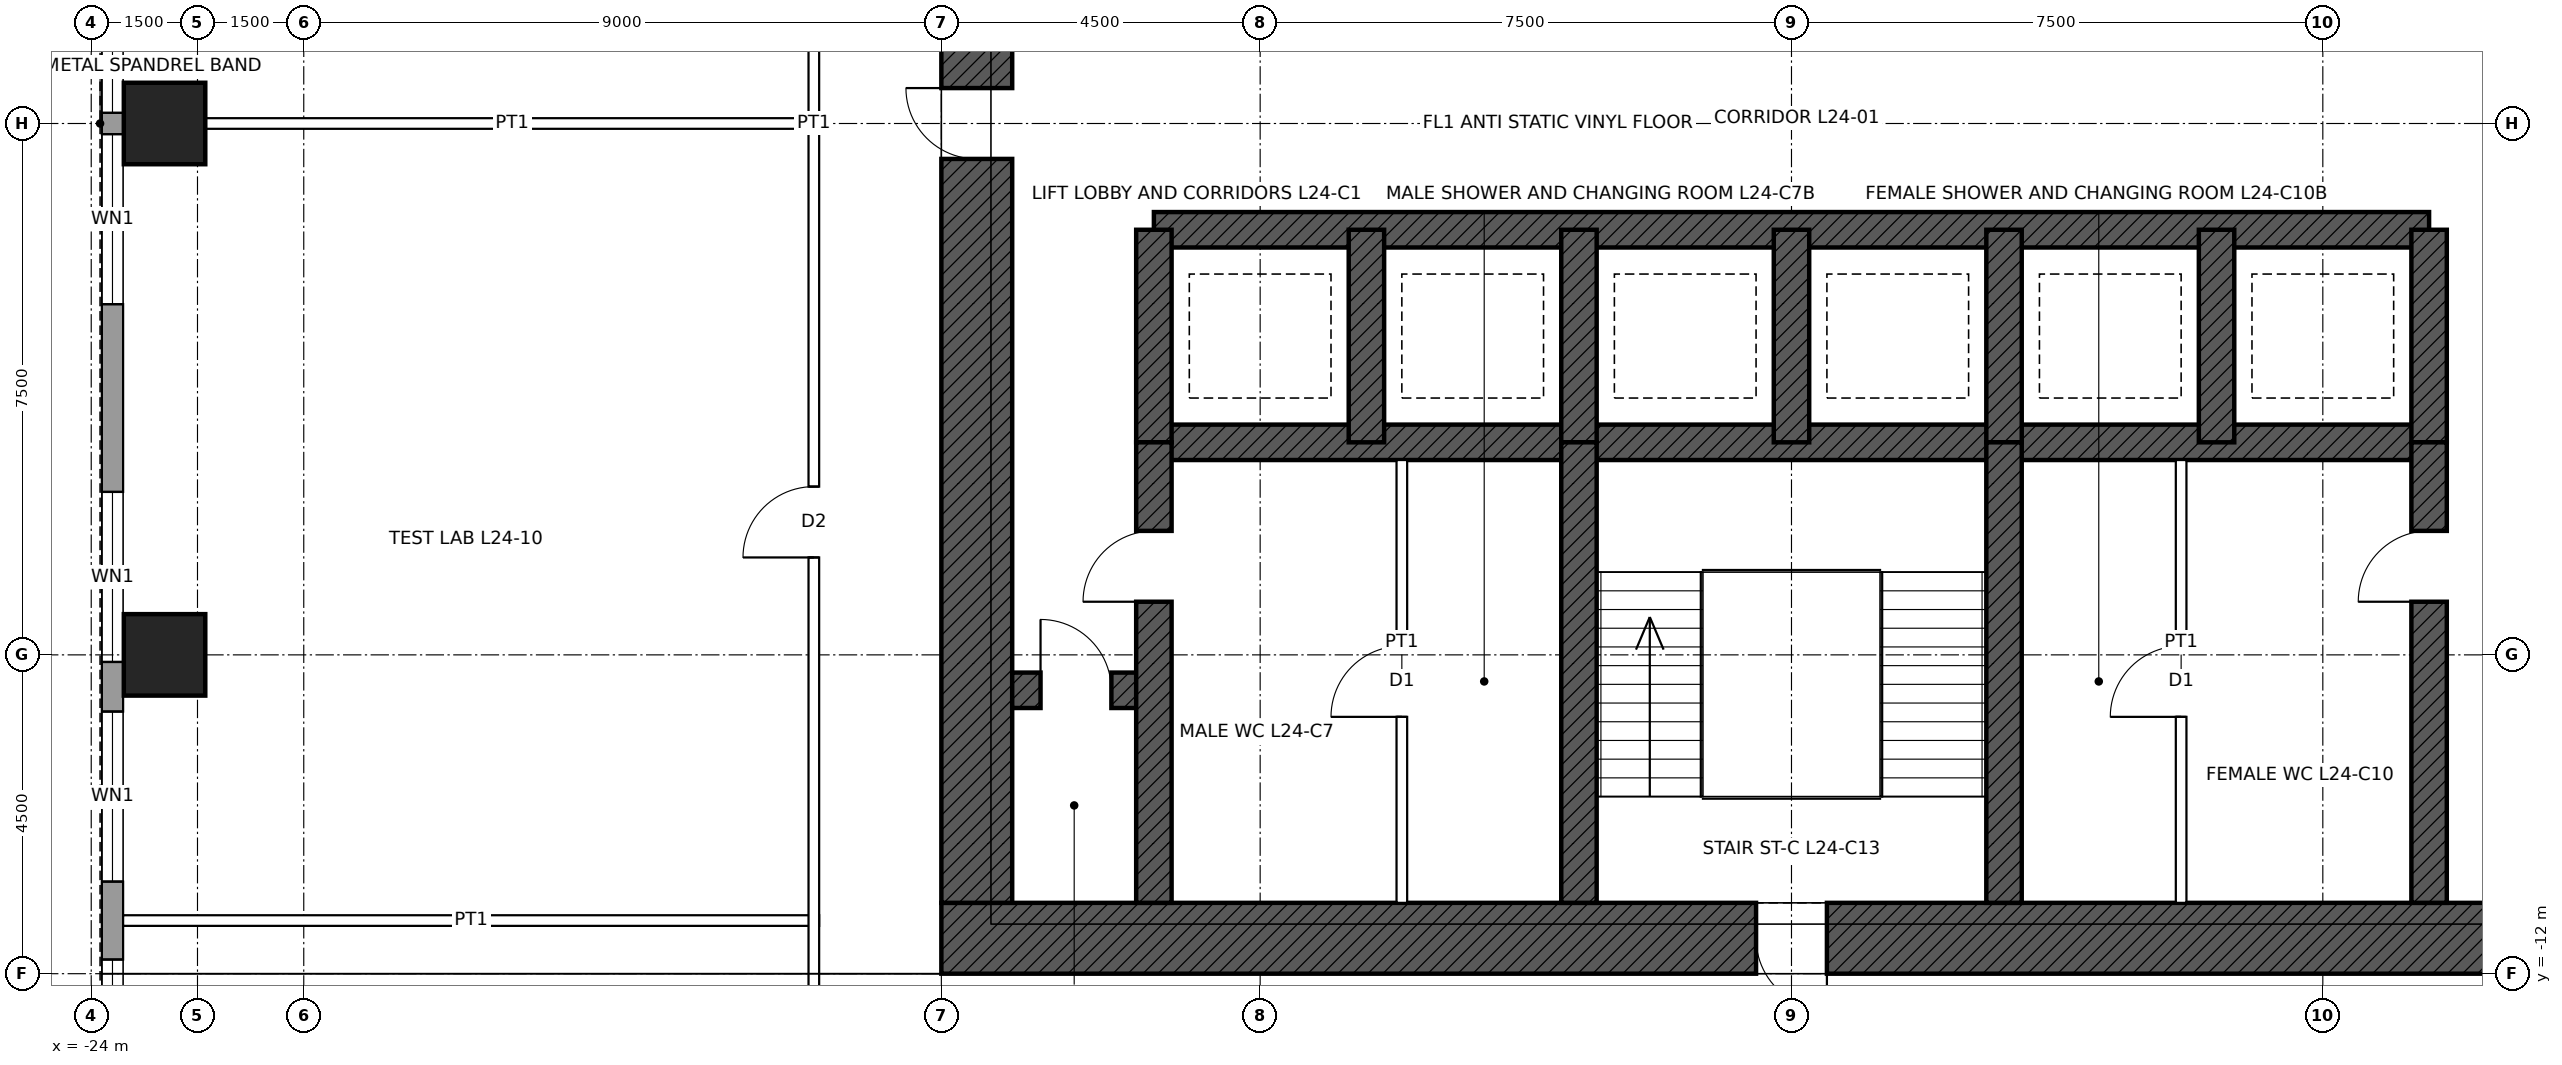
"""IFC4 building model, lengths in metres.
Left out: names, types, materials, properties, quantities, classifications, styles, units other than length and angle.
Written with IfcOpenShell. Run it as: python <this file> out.ifc"""

import sys

from ifc_helpers import new_model, si_unit, direction, frame, frame_2d, origin, origin_2d, place, context, subcontext, project, spatial, rectangle, hollow_rectangle, extrude, element, fill, save


model = new_model("IFC4")
c1 = context("Model", 3, precision=1e-05, world=origin(), true_north=direction((0.0, 1.0)))
c2 = subcontext(c1, "Body", "Model", "MODEL_VIEW")
j1 = project(units=[si_unit("LENGTHUNIT", "METRE"), si_unit("PLANEANGLEUNIT", "RADIAN")], contexts=[c1])
p1 = place(None, origin())
s1 = spatial("IfcSite", under=j1, at=p1, CompositionType="ELEMENT")
p2 = place(p1, origin())
s2 = spatial("IfcBuilding", under=s1, at=p2, CompositionType="ELEMENT")
p3 = place(p2, frame((0.0, 0.0, 122.4)))
s3 = spatial("IfcBuildingStorey", under=s2, at=p3, CompositionType="ELEMENT", Elevation=122.4)
for number, where, z_axis, x_axis in (
    (1, (-22.965, -7.5, 0.0), (0.0, 0.0, 1.0), (1.0, 0.0, 0.0)),
    (2, (-22.965, 0.0, 0.0), (0.0, 0.0, 1.0), (1.0, 0.0, 0.0)),
):
    element("IfcColumn", number, at=place(p3, frame(where, z_axis=z_axis, x_axis=x_axis)), inside=s3, PredefinedType="COLUMN", context=c2, shape_type="SweptSolid", body=[
        extrude(hollow_rectangle(XDim=1.15, YDim=1.15, WallThickness=0.075, at=origin_2d()), origin(), (0.0, 0.0, 1.0), 4.5),
    ])
p4 = place(p3, frame((12.0, -11.5, 0.0), z_axis=(0.0, 0.0, 1.0), x_axis=(-1.0, 0.0, 0.0)))
e3 = element("IfcWall", 3, at=p4, inside=s3, PredefinedType="SHEAR", context=c2, shape_type="SweptSolid", body=[
    extrude(rectangle(XDim=24.0, YDim=1.0, at=frame_2d((12.0, 0.0))), origin(), (0.0, 0.0, 1.0), 4.5),
])
p5 = place(p4, frame((11.5, 0.0, 0.0)))
e4 = element("IfcOpeningElement", 4, at=p5, cuts=e3, PredefinedType="OPENING", context=c2, shape_type="SweptSolid", body=[
    extrude(rectangle(XDim=1.0, YDim=2.1, at=frame_2d((0.5, 1.05))), frame((0.0, 0.51, 0.0), z_axis=(0.0, -1.0, 0.0), x_axis=(1.0, 0.0, 0.0)), (0.0, 0.0, 1.0), 1.02),
])
p6 = place(p4, frame((1.0, 0.0, 0.0)))
e5 = element("IfcOpeningElement", 5, at=p6, cuts=e3, PredefinedType="OPENING", context=c2, shape_type="SweptSolid", body=[
    extrude(rectangle(XDim=1.0, YDim=2.4, at=frame_2d((0.5, 1.2))), frame((0.0, 0.51, 0.0), z_axis=(0.0, -1.0, 0.0), x_axis=(1.0, 0.0, 0.0)), (0.0, 0.0, 1.0), 1.02),
])
p7 = place(p3, frame((-11.5, -11.0, 0.0), z_axis=(0.0, 0.0, 1.0), x_axis=(0.0, 1.0, 0.0)))
e6 = element("IfcWall", 6, at=p7, inside=s3, PredefinedType="SHEAR", context=c2, shape_type="SweptSolid", body=[
    extrude(rectangle(XDim=22.0, YDim=1.0, at=frame_2d((11.0, 0.0))), origin(), (0.0, 0.0, 1.0), 4.5),
])
p8 = place(p7, frame((10.5, 0.0, 0.0)))
e7 = element("IfcOpeningElement", 7, at=p8, cuts=e6, PredefinedType="OPENING", context=c2, shape_type="SweptSolid", body=[
    extrude(rectangle(XDim=1.0, YDim=2.4, at=frame_2d((0.5, 1.2))), frame((0.0, 0.51, 0.0), z_axis=(0.0, -1.0, 0.0), x_axis=(1.0, 0.0, 0.0)), (0.0, 0.0, 1.0), 1.02),
])
for number, where, z_axis, x_axis in (
    (8, (-9.0, -1.5, 0.0), (0.0, 0.0, 1.0), (1.0, 0.0, 0.0)),
    (9, (-9.0, -4.5, 0.0), (0.0, 0.0, 1.0), (1.0, 0.0, 0.0)),
):
    element("IfcWall", number, at=place(p3, frame(where, z_axis=z_axis, x_axis=x_axis)), inside=s3, PredefinedType="SHEAR", context=c2, shape_type="SweptSolid", body=[
        extrude(rectangle(XDim=18.0, YDim=0.5, at=frame_2d((9.0, 0.0))), origin(), (0.0, 0.0, 1.0), 4.5),
    ])
p9 = place(p3, frame((-11.0, -8.0, 0.0), z_axis=(0.0, 0.0, 1.0), x_axis=(1.0, 0.0, 0.0)))
e10 = element("IfcWall", 10, at=p9, inside=s3, PredefinedType="SHEAR", context=c2, shape_type="SweptSolid", body=[
    extrude(rectangle(XDim=2.0, YDim=0.5, at=frame_2d((1.0, 0.0))), origin(), (0.0, 0.0, 1.0), 4.5),
])
p10 = place(p9, frame((0.4, 0.0, 0.0)))
e11 = element("IfcOpeningElement", 11, at=p10, cuts=e10, PredefinedType="OPENING", context=c2, shape_type="SweptSolid", body=[
    extrude(rectangle(XDim=1.0, YDim=2.1, at=frame_2d((0.5, 1.05))), frame((0.0, 0.26, 0.0), z_axis=(0.0, -1.0, 0.0), x_axis=(1.0, 0.0, 0.0)), (0.0, 0.0, 1.0), 0.52),
])
for number, where, z_axis, x_axis in (
    (12, (-9.0, -4.5, 0.0), (0.0, 0.0, 1.0), (0.0, 1.0, 0.0)),
    (13, (9.0, -4.5, 0.0), (0.0, 0.0, 1.0), (0.0, 1.0, 0.0)),
    (14, (-6.0, -4.5, 0.0), (0.0, 0.0, 1.0), (0.0, 1.0, 0.0)),
    (15, (-3.0, -4.5, 0.0), (0.0, 0.0, 1.0), (0.0, 1.0, 0.0)),
    (16, (0.0, -4.5, 0.0), (0.0, 0.0, 1.0), (0.0, 1.0, 0.0)),
    (17, (3.0, -4.5, 0.0), (0.0, 0.0, 1.0), (0.0, 1.0, 0.0)),
    (18, (6.0, -4.5, 0.0), (0.0, 0.0, 1.0), (0.0, 1.0, 0.0)),
):
    element("IfcWall", number, at=place(p3, frame(where, z_axis=z_axis, x_axis=x_axis)), inside=s3, PredefinedType="SHEAR", context=c2, shape_type="SweptSolid", body=[
        extrude(rectangle(XDim=3.0, YDim=0.5, at=frame_2d((1.5, 0.0))), origin(), (0.0, 0.0, 1.0), 4.5),
    ])
p11 = place(p3, frame((-9.0, -11.0, 0.0), z_axis=(0.0, 0.0, 1.0), x_axis=(0.0, 1.0, 0.0)))
e19 = element("IfcWall", 19, at=p11, inside=s3, PredefinedType="SHEAR", context=c2, shape_type="SweptSolid", body=[
    extrude(rectangle(XDim=6.5, YDim=0.5, at=frame_2d((3.25, 0.0))), origin(), (0.0, 0.0, 1.0), 4.5),
])
p12 = place(p11, frame((4.25, 0.0, 0.0)))
e20 = element("IfcOpeningElement", 20, at=p12, cuts=e19, PredefinedType="OPENING", context=c2, shape_type="SweptSolid", body=[
    extrude(rectangle(XDim=1.0, YDim=2.1, at=frame_2d((0.5, 1.05))), frame((0.0, 0.26, 0.0), z_axis=(0.0, -1.0, 0.0), x_axis=(1.0, 0.0, 0.0)), (0.0, 0.0, 1.0), 0.52),
])
p13 = place(p3, frame((9.0, -11.0, 0.0), z_axis=(0.0, 0.0, 1.0), x_axis=(0.0, 1.0, 0.0)))
e21 = element("IfcWall", 21, at=p13, inside=s3, PredefinedType="SHEAR", context=c2, shape_type="SweptSolid", body=[
    extrude(rectangle(XDim=6.5, YDim=0.5, at=frame_2d((3.25, 0.0))), origin(), (0.0, 0.0, 1.0), 4.5),
])
p14 = place(p13, frame((4.25, 0.0, 0.0)))
e22 = element("IfcOpeningElement", 22, at=p14, cuts=e21, PredefinedType="OPENING", context=c2, shape_type="SweptSolid", body=[
    extrude(rectangle(XDim=1.0, YDim=2.1, at=frame_2d((0.5, 1.05))), frame((0.0, 0.26, 0.0), z_axis=(0.0, -1.0, 0.0), x_axis=(1.0, 0.0, 0.0)), (0.0, 0.0, 1.0), 0.52),
])
for number, where, z_axis, x_axis in (
    (23, (-3.0, -11.0, 0.0), (0.0, 0.0, 1.0), (0.0, 1.0, 0.0)),
    (24, (3.0, -11.0, 0.0), (0.0, 0.0, 1.0), (0.0, 1.0, 0.0)),
):
    element("IfcWall", number, at=place(p3, frame(where, z_axis=z_axis, x_axis=x_axis)), inside=s3, PredefinedType="SHEAR", context=c2, shape_type="SweptSolid", body=[
        extrude(rectangle(XDim=6.5, YDim=0.5, at=frame_2d((3.25, 0.0))), origin(), (0.0, 0.0, 1.0), 4.5),
    ])
p15 = place(p3, frame((-23.7, -16.2, 0.0), z_axis=(0.0, 0.0, 1.0), x_axis=(0.0, 1.0, 0.0)))
e25 = element("IfcWall", 25, at=p15, inside=s3, PredefinedType="SOLIDWALL", context=c2, shape_type="SweptSolid", body=[
    extrude(rectangle(XDim=32.4, YDim=0.3, at=frame_2d((16.2, 0.0))), origin(), (0.0, 0.0, 1.0), 4.3),
])
p16 = place(p15, frame((2.0, 0.0, 1.0)))
e26 = element("IfcOpeningElement", 26, at=p16, cuts=e25, PredefinedType="OPENING", context=c2, shape_type="SweptSolid", body=[
    extrude(rectangle(XDim=2.4, YDim=1.2, at=frame_2d((1.2, 0.6))), frame((0.0, 0.16, 0.0), z_axis=(0.0, -1.0, 0.0), x_axis=(1.0, 0.0, 0.0)), (0.0, 0.0, 1.0), 0.32),
])
p17 = place(p15, frame((5.5, 0.0, 1.0)))
e27 = element("IfcOpeningElement", 27, at=p17, cuts=e25, PredefinedType="OPENING", context=c2, shape_type="SweptSolid", body=[
    extrude(rectangle(XDim=2.4, YDim=1.2, at=frame_2d((1.2, 0.6))), frame((0.0, 0.16, 0.0), z_axis=(0.0, -1.0, 0.0), x_axis=(1.0, 0.0, 0.0)), (0.0, 0.0, 1.0), 0.32),
])
p18 = place(p15, frame((8.6, 0.0, 1.0)))
e28 = element("IfcOpeningElement", 28, at=p18, cuts=e25, PredefinedType="OPENING", context=c2, shape_type="SweptSolid", body=[
    extrude(rectangle(XDim=2.4, YDim=1.2, at=frame_2d((1.2, 0.6))), frame((0.0, 0.16, 0.0), z_axis=(0.0, -1.0, 0.0), x_axis=(1.0, 0.0, 0.0)), (0.0, 0.0, 1.0), 0.32),
])
p19 = place(p15, frame((13.65, 0.0, 1.0)))
e29 = element("IfcOpeningElement", 29, at=p19, cuts=e25, PredefinedType="OPENING", context=c2, shape_type="SweptSolid", body=[
    extrude(rectangle(XDim=2.4, YDim=1.2, at=frame_2d((1.2, 0.6))), frame((0.0, 0.16, 0.0), z_axis=(0.0, -1.0, 0.0), x_axis=(1.0, 0.0, 0.0)), (0.0, 0.0, 1.0), 0.32),
])
p20 = place(p15, frame((16.35, 0.0, 1.0)))
e30 = element("IfcOpeningElement", 30, at=p20, cuts=e25, PredefinedType="OPENING", context=c2, shape_type="SweptSolid", body=[
    extrude(rectangle(XDim=2.4, YDim=1.2, at=frame_2d((1.2, 0.6))), frame((0.0, 0.16, 0.0), z_axis=(0.0, -1.0, 0.0), x_axis=(1.0, 0.0, 0.0)), (0.0, 0.0, 1.0), 0.32),
])
p21 = place(p15, frame((21.4, 0.0, 1.0)))
e31 = element("IfcOpeningElement", 31, at=p21, cuts=e25, PredefinedType="OPENING", context=c2, shape_type="SweptSolid", body=[
    extrude(rectangle(XDim=2.4, YDim=1.2, at=frame_2d((1.2, 0.6))), frame((0.0, 0.16, 0.0), z_axis=(0.0, -1.0, 0.0), x_axis=(1.0, 0.0, 0.0)), (0.0, 0.0, 1.0), 0.32),
])
p22 = place(p15, frame((24.5, 0.0, 1.0)))
e32 = element("IfcOpeningElement", 32, at=p22, cuts=e25, PredefinedType="OPENING", context=c2, shape_type="SweptSolid", body=[
    extrude(rectangle(XDim=2.4, YDim=1.2, at=frame_2d((1.2, 0.6))), frame((0.0, 0.16, 0.0), z_axis=(0.0, -1.0, 0.0), x_axis=(1.0, 0.0, 0.0)), (0.0, 0.0, 1.0), 0.32),
])
p23 = place(p15, frame((28.0, 0.0, 1.0)))
e33 = element("IfcOpeningElement", 33, at=p23, cuts=e25, PredefinedType="OPENING", context=c2, shape_type="SweptSolid", body=[
    extrude(rectangle(XDim=2.4, YDim=1.2, at=frame_2d((1.2, 0.6))), frame((0.0, 0.16, 0.0), z_axis=(0.0, -1.0, 0.0), x_axis=(1.0, 0.0, 0.0)), (0.0, 0.0, 1.0), 0.32),
])
p24 = place(p3, frame((-23.55, -11.25, 0.0), z_axis=(0.0, 0.0, 1.0), x_axis=(1.0, 0.0, 0.0)))
e34 = element("IfcWall", 34, at=p24, inside=s3, PredefinedType="PARTITIONING", context=c2, shape_type="SweptSolid", body=[
    extrude(rectangle(XDim=9.825, YDim=0.15, at=frame_2d((4.913, 0.0))), origin(), (0.0, 0.0, 1.0), 3.431),
])
p25 = place(p3, frame((-22.39, 0.0, 0.0), z_axis=(0.0, 0.0, 1.0), x_axis=(1.0, 0.0, 0.0)))
e35 = element("IfcWall", 35, at=p25, inside=s3, PredefinedType="PARTITIONING", context=c2, shape_type="SweptSolid", body=[
    extrude(rectangle(XDim=8.665, YDim=0.15, at=frame_2d((4.333, 0.0))), origin(), (0.0, 0.0, 1.0), 3.431),
])
p26 = place(p3, frame((-13.8, -13.875, 0.0), z_axis=(0.0, 0.0, 1.0), x_axis=(0.0, 1.0, 0.0)))
e36 = element("IfcWall", 36, at=p26, inside=s3, PredefinedType="PARTITIONING", context=c2, shape_type="SweptSolid", body=[
    extrude(rectangle(XDim=27.75, YDim=0.15, at=frame_2d((13.875, 0.0))), origin(), (0.0, 0.0, 1.0), 4.3),
])
p27 = place(p26, frame((7.75, 0.0, 0.0)))
e37 = element("IfcOpeningElement", 37, at=p27, cuts=e36, PredefinedType="OPENING", context=c2, shape_type="SweptSolid", body=[
    extrude(rectangle(XDim=1.0, YDim=2.1, at=frame_2d((0.5, 1.05))), frame((0.0, 0.085, 0.0), z_axis=(0.0, -1.0, 0.0), x_axis=(1.0, 0.0, 0.0)), (0.0, 0.0, 1.0), 0.17),
])
p28 = place(p26, frame((18.6, 0.0, 0.0)))
e38 = element("IfcOpeningElement", 38, at=p28, cuts=e36, PredefinedType="OPENING", context=c2, shape_type="SweptSolid", body=[
    extrude(rectangle(XDim=1.8, YDim=2.4, at=frame_2d((0.9, 1.2))), frame((0.0, 0.085, 0.0), z_axis=(0.0, -1.0, 0.0), x_axis=(1.0, 0.0, 0.0)), (0.0, 0.0, 1.0), 0.17),
])
p29 = place(p3, frame((-5.5, -11.0, 0.0), z_axis=(0.0, 0.0, 1.0), x_axis=(0.0, 1.0, 0.0)))
e39 = element("IfcWall", 39, at=p29, inside=s3, PredefinedType="PARTITIONING", context=c2, shape_type="SweptSolid", body=[
    extrude(rectangle(XDim=6.25, YDim=0.15, at=frame_2d((3.125, 0.0))), origin(), (0.0, 0.0, 1.0), 4.25),
])
p30 = place(p29, frame((2.625, 0.0, 0.0)))
e40 = element("IfcOpeningElement", 40, at=p30, cuts=e39, PredefinedType="OPENING", context=c2, shape_type="SweptSolid", body=[
    extrude(rectangle(XDim=1.0, YDim=2.1, at=frame_2d((0.5, 1.05))), frame((0.0, 0.085, 0.0), z_axis=(0.0, -1.0, 0.0), x_axis=(1.0, 0.0, 0.0)), (0.0, 0.0, 1.0), 0.17),
])
p31 = place(p3, frame((5.5, -11.0, 0.0), z_axis=(0.0, 0.0, 1.0), x_axis=(0.0, 1.0, 0.0)))
e41 = element("IfcWall", 41, at=p31, inside=s3, PredefinedType="PARTITIONING", context=c2, shape_type="SweptSolid", body=[
    extrude(rectangle(XDim=6.25, YDim=0.15, at=frame_2d((3.125, 0.0))), origin(), (0.0, 0.0, 1.0), 4.25),
])
p32 = place(p31, frame((2.625, 0.0, 0.0)))
e42 = element("IfcOpeningElement", 42, at=p32, cuts=e41, PredefinedType="OPENING", context=c2, shape_type="SweptSolid", body=[
    extrude(rectangle(XDim=1.0, YDim=2.1, at=frame_2d((0.5, 1.05))), frame((0.0, 0.085, 0.0), z_axis=(0.0, -1.0, 0.0), x_axis=(1.0, 0.0, 0.0)), (0.0, 0.0, 1.0), 0.17),
])
p33 = place(p16, origin())
e43 = element("IfcWindow", 43, at=p33, inside=s3, PartitioningType="SINGLE_PANEL", PredefinedType="WINDOW", context=c2, shape_type="SweptSolid", body=[
    extrude(rectangle(XDim=2.4, YDim=1.2, at=frame_2d((1.2, 0.6))), frame((0.0, 0.03, 0.0), z_axis=(0.0, -1.0, 0.0), x_axis=(1.0, 0.0, 0.0)), (0.0, 0.0, 1.0), 0.06),
])
fill(e26, e43)
p34 = place(p17, origin())
e44 = element("IfcWindow", 44, at=p34, inside=s3, PartitioningType="SINGLE_PANEL", PredefinedType="WINDOW", context=c2, shape_type="SweptSolid", body=[
    extrude(rectangle(XDim=2.4, YDim=1.2, at=frame_2d((1.2, 0.6))), frame((0.0, 0.03, 0.0), z_axis=(0.0, -1.0, 0.0), x_axis=(1.0, 0.0, 0.0)), (0.0, 0.0, 1.0), 0.06),
])
fill(e27, e44)
p35 = place(p18, origin())
e45 = element("IfcWindow", 45, at=p35, inside=s3, PartitioningType="SINGLE_PANEL", PredefinedType="WINDOW", context=c2, shape_type="SweptSolid", body=[
    extrude(rectangle(XDim=2.4, YDim=1.2, at=frame_2d((1.2, 0.6))), frame((0.0, 0.03, 0.0), z_axis=(0.0, -1.0, 0.0), x_axis=(1.0, 0.0, 0.0)), (0.0, 0.0, 1.0), 0.06),
])
fill(e28, e45)
p36 = place(p19, origin())
e46 = element("IfcWindow", 46, at=p36, inside=s3, PartitioningType="SINGLE_PANEL", PredefinedType="WINDOW", context=c2, shape_type="SweptSolid", body=[
    extrude(rectangle(XDim=2.4, YDim=1.2, at=frame_2d((1.2, 0.6))), frame((0.0, 0.03, 0.0), z_axis=(0.0, -1.0, 0.0), x_axis=(1.0, 0.0, 0.0)), (0.0, 0.0, 1.0), 0.06),
])
fill(e29, e46)
p37 = place(p20, origin())
e47 = element("IfcWindow", 47, at=p37, inside=s3, PartitioningType="SINGLE_PANEL", PredefinedType="WINDOW", context=c2, shape_type="SweptSolid", body=[
    extrude(rectangle(XDim=2.4, YDim=1.2, at=frame_2d((1.2, 0.6))), frame((0.0, 0.03, 0.0), z_axis=(0.0, -1.0, 0.0), x_axis=(1.0, 0.0, 0.0)), (0.0, 0.0, 1.0), 0.06),
])
fill(e30, e47)
p38 = place(p5, origin())
e48 = element("IfcDoor", 48, at=p38, inside=s3, OperationType="SINGLE_SWING_LEFT", PredefinedType="DOOR", context=c2, shape_type="SweptSolid", body=[
    extrude(rectangle(XDim=1.0, YDim=2.1, at=frame_2d((0.5, 1.05))), frame((0.0, 0.485, 0.0), z_axis=(0.0, -1.0, 0.0), x_axis=(1.0, 0.0, 0.0)), (0.0, 0.0, 1.0), 0.05),
])
fill(e4, e48)
p39 = place(p8, origin())
e49 = element("IfcDoor", 49, at=p39, inside=s3, OperationType="SINGLE_SWING_RIGHT", PredefinedType="DOOR", context=c2, shape_type="SweptSolid", body=[
    extrude(rectangle(XDim=1.0, YDim=2.4, at=frame_2d((0.5, 1.2))), frame((0.0, 0.485, 0.0), z_axis=(0.0, -1.0, 0.0), x_axis=(1.0, 0.0, 0.0)), (0.0, 0.0, 1.0), 0.05),
])
fill(e7, e49)
p40 = place(p12, origin())
e50 = element("IfcDoor", 50, at=p40, inside=s3, OperationType="SINGLE_SWING_LEFT", PredefinedType="DOOR", context=c2, shape_type="SweptSolid", body=[
    extrude(rectangle(XDim=1.0, YDim=2.1, at=frame_2d((0.5, 1.05))), frame((0.0, 0.025, 0.0), z_axis=(0.0, -1.0, 0.0), x_axis=(1.0, 0.0, 0.0)), (0.0, 0.0, 1.0), 0.05),
])
fill(e20, e50)
p41 = place(p14, origin())
e51 = element("IfcDoor", 51, at=p41, inside=s3, OperationType="SINGLE_SWING_LEFT", PredefinedType="DOOR", context=c2, shape_type="SweptSolid", body=[
    extrude(rectangle(XDim=1.0, YDim=2.1, at=frame_2d((0.5, 1.05))), frame((0.0, 0.025, 0.0), z_axis=(0.0, -1.0, 0.0), x_axis=(1.0, 0.0, 0.0)), (0.0, 0.0, 1.0), 0.05),
])
fill(e22, e51)
p42 = place(p10, origin())
e52 = element("IfcDoor", 52, at=p42, inside=s3, OperationType="SINGLE_SWING_LEFT", PredefinedType="DOOR", context=c2, shape_type="SweptSolid", body=[
    extrude(rectangle(XDim=1.0, YDim=2.1, at=frame_2d((0.5, 1.05))), frame((0.0, 0.025, 0.0), z_axis=(0.0, -1.0, 0.0), x_axis=(1.0, 0.0, 0.0)), (0.0, 0.0, 1.0), 0.05),
])
fill(e11, e52)
p43 = place(p30, origin())
e53 = element("IfcDoor", 53, at=p43, inside=s3, OperationType="SINGLE_SWING_LEFT", PredefinedType="DOOR", context=c2, shape_type="SweptSolid", body=[
    extrude(rectangle(XDim=1.0, YDim=2.1, at=frame_2d((0.5, 1.05))), frame((0.0, 0.025, 0.0), z_axis=(0.0, -1.0, 0.0), x_axis=(1.0, 0.0, 0.0)), (0.0, 0.0, 1.0), 0.05),
])
fill(e40, e53)
p44 = place(p32, origin())
e54 = element("IfcDoor", 54, at=p44, inside=s3, OperationType="SINGLE_SWING_LEFT", PredefinedType="DOOR", context=c2, shape_type="SweptSolid", body=[
    extrude(rectangle(XDim=1.0, YDim=2.1, at=frame_2d((0.5, 1.05))), frame((0.0, 0.025, 0.0), z_axis=(0.0, -1.0, 0.0), x_axis=(1.0, 0.0, 0.0)), (0.0, 0.0, 1.0), 0.05),
])
fill(e42, e54)
p45 = place(p27, origin())
e55 = element("IfcDoor", 55, at=p45, inside=s3, OperationType="SINGLE_SWING_LEFT", PredefinedType="DOOR", context=c2, shape_type="SweptSolid", body=[
    extrude(rectangle(XDim=1.0, YDim=2.1, at=frame_2d((0.5, 1.05))), frame((0.0, 0.025, 0.0), z_axis=(0.0, -1.0, 0.0), x_axis=(1.0, 0.0, 0.0)), (0.0, 0.0, 1.0), 0.05),
])
fill(e37, e55)
save(model, sys.argv[1])
